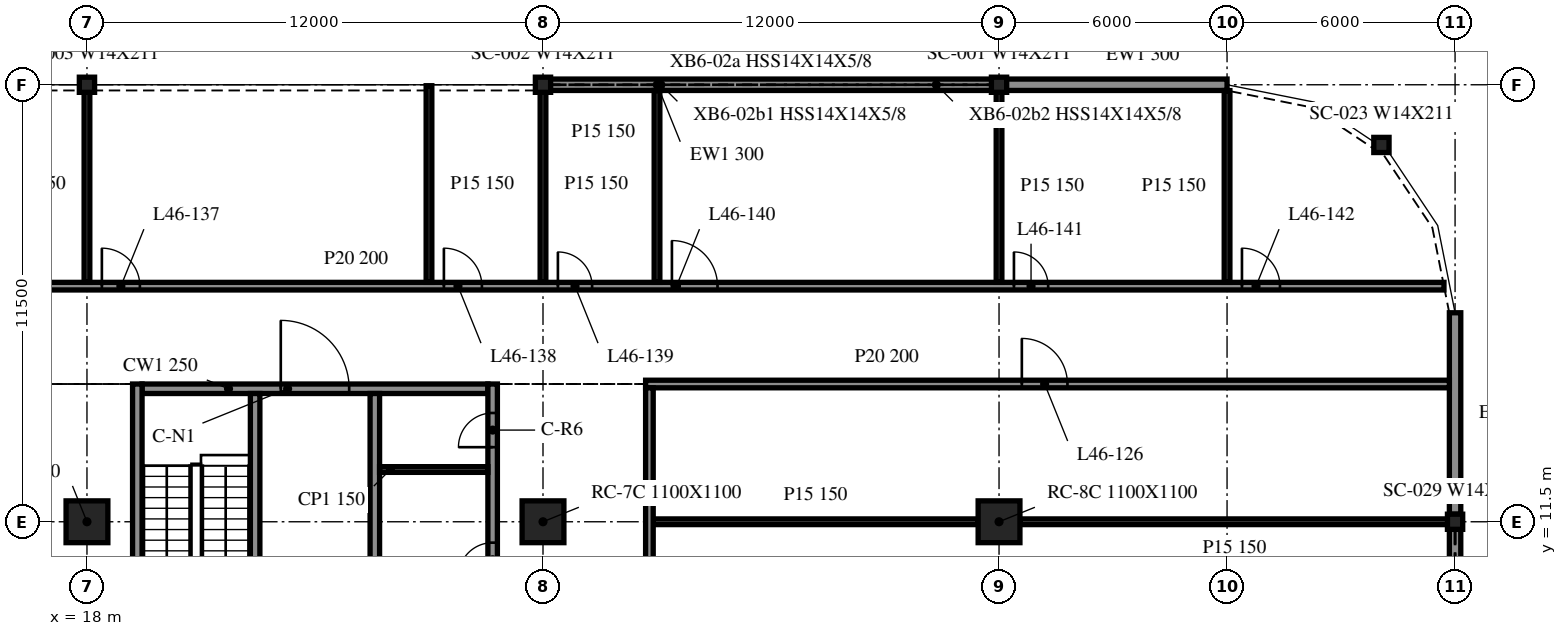
"""IFC4 building model, lengths in metres.
Left out: names, types, materials, properties, quantities, classifications, styles, units other than length and angle.
Written with IfcOpenShell. Run it as: python <this file> out.ifc"""

import sys

from ifc_helpers import new_model, si_unit, direction, frame, frame_2d, origin, origin_2d, place, context, subcontext, project, spatial, rectangle, i_section, extrude, element, fill, save


model = new_model("IFC4")
c1 = context("Model", 3, precision=1e-05, world=origin(), true_north=direction((0.0, 1.0)))
c2 = subcontext(c1, "Body", "Model", "MODEL_VIEW")
j1 = project(units=[si_unit("LENGTHUNIT", "METRE"), si_unit("PLANEANGLEUNIT", "RADIAN")], contexts=[c1])
p1 = place(None, origin())
s1 = spatial("IfcSite", under=j1, at=p1, CompositionType="ELEMENT")
p2 = place(p1, origin())
s2 = spatial("IfcBuilding", under=s1, at=p2, CompositionType="ELEMENT")
p3 = place(p2, frame((0.0, 0.0, 193.9)))
s3 = spatial("IfcBuildingStorey", under=s2, at=p3, CompositionType="ELEMENT", Elevation=193.9)
for number, where, z_axis, x_axis in (
    (1, (18.0, 11.5, -0.34), (0.0, 0.0, 1.0), (1.0, 0.0, 0.0)),
    (2, (30.0, 11.5, -0.34), (0.0, 0.0, 1.0), (1.0, 0.0, 0.0)),
    (3, (42.0, 11.5, -0.34), (0.0, 0.0, 1.0), (1.0, 0.0, 0.0)),
):
    element("IfcColumn", number, at=place(p3, frame(where, z_axis=z_axis, x_axis=x_axis)), inside=s3, PredefinedType="COLUMN", context=c2, shape_type="SweptSolid", body=[
        extrude(rectangle(XDim=1.1, YDim=1.1, at=origin_2d()), origin(), (0.0, 0.0, 1.0), 3.8),
    ])
for number, where, z_axis, x_axis in (
    (4, (52.062, 21.416, -0.34), (0.0, 0.0, 1.0), (1.0, 0.0, 0.0)),
    (5, (42.0, 23.0, -0.34), (0.0, 0.0, 1.0), (1.0, 0.0, 0.0)),
    (6, (30.0, 23.0, -0.34), (0.0, 0.0, 1.0), (1.0, 0.0, 0.0)),
    (7, (18.0, 23.0, -0.34), (0.0, 0.0, 1.0), (1.0, 0.0, 0.0)),
    (8, (54.0, 11.5, -0.34), (0.0, 0.0, 1.0), (1.0, 0.0, 0.0)),
):
    element("IfcColumn", number, at=place(p3, frame(where, z_axis=z_axis, x_axis=x_axis)), inside=s3, PredefinedType="COLUMN", context=c2, shape_type="SweptSolid", body=[
        extrude(i_section(OverallWidth=0.401, OverallDepth=0.399, WebThickness=0.025, FlangeThickness=0.04, at=origin_2d()), origin(), (0.0, 0.0, 1.0), 3.8),
    ])
p4 = place(p3, frame((48.0, 23.0, 0.0), z_axis=(0.0, 0.0, 1.0), x_axis=(-1.0, 0.0, 0.0)))
e9 = element("IfcWall", 9, at=p4, inside=s3, PredefinedType="NOTDEFINED", context=c2, shape_type="SweptSolid", body=[
    extrude(rectangle(XDim=5.988, YDim=0.3, at=frame_2d((2.994, 0.0))), origin(), (0.0, 0.0, 1.0), 2.782),
])
p5 = place(p3, frame((41.988, 23.0, 0.0), z_axis=(0.0, 0.0, 1.0), x_axis=(-1.0, 0.0, 0.0)))
e10 = element("IfcWall", 10, at=p5, inside=s3, PredefinedType="NOTDEFINED", context=c2, shape_type="SweptSolid", body=[
    extrude(rectangle(XDim=11.975, YDim=0.3, at=frame_2d((5.988, 0.0))), origin(), (0.0, 0.0, 1.0), 2.782),
])
p6 = place(p3, frame((54.0, 0.2, 0.0), z_axis=(0.0, 0.0, 1.0), x_axis=(0.0, 1.0, 0.0)))
e11 = element("IfcWall", 11, at=p6, inside=s3, PredefinedType="NOTDEFINED", context=c2, shape_type="SweptSolid", body=[
    extrude(rectangle(XDim=11.1, YDim=0.3, at=frame_2d((5.55, 0.0))), origin(), (0.0, 0.0, 1.0), 2.782),
])
p7 = place(p3, frame((54.0, 11.7, 0.0), z_axis=(0.0, 0.0, 1.0), x_axis=(0.0, 1.0, 0.0)))
e12 = element("IfcWall", 12, at=p7, inside=s3, PredefinedType="NOTDEFINED", context=c2, shape_type="SweptSolid", body=[
    extrude(rectangle(XDim=5.3, YDim=0.3, at=frame_2d((2.65, 0.0))), origin(), (0.0, 0.0, 1.0), 2.782),
])
p8 = place(p3, frame((19.325, 15.125, 0.0), z_axis=(0.0, 0.0, 1.0), x_axis=(0.0, -1.0, 0.0)))
e13 = element("IfcWall", 13, at=p8, inside=s3, PredefinedType="SOLIDWALL", context=c2, shape_type="SweptSolid", body=[
    extrude(rectangle(XDim=24.25, YDim=0.25, at=frame_2d((12.125, 0.0))), origin(), (0.0, 0.0, 1.0), 3.46),
])
p9 = place(p3, frame((28.675, -9.125, 0.0), z_axis=(0.0, 0.0, 1.0), x_axis=(0.0, 1.0, 0.0)))
e14 = element("IfcWall", 14, at=p9, inside=s3, PredefinedType="SOLIDWALL", context=c2, shape_type="SweptSolid", body=[
    extrude(rectangle(XDim=24.25, YDim=0.25, at=frame_2d((12.125, 0.0))), origin(), (0.0, 0.0, 1.0), 3.46),
])
p10 = place(p9, frame((14.425, 0.0, 0.0)))
e15 = element("IfcOpeningElement", 15, at=p10, cuts=e14, PredefinedType="OPENING", context=c2, shape_type="SweptSolid", body=[
    extrude(rectangle(XDim=0.9, YDim=2.1, at=frame_2d((0.45, 1.05))), frame((0.0, 0.135, 0.0), z_axis=(0.0, -1.0, 0.0), x_axis=(1.0, 0.0, 0.0)), (0.0, 0.0, 1.0), 0.27),
])
p11 = place(p9, frame((19.175, 0.0, 0.0)))
e16 = element("IfcOpeningElement", 16, at=p11, cuts=e14, PredefinedType="OPENING", context=c2, shape_type="SweptSolid", body=[
    extrude(rectangle(XDim=0.9, YDim=2.1, at=frame_2d((0.45, 1.05))), frame((0.0, 0.135, 0.0), z_axis=(0.0, -1.0, 0.0), x_axis=(1.0, 0.0, 0.0)), (0.0, 0.0, 1.0), 0.27),
])
p12 = place(p9, frame((22.587, 0.0, 0.0)))
e17 = element("IfcOpeningElement", 17, at=p12, cuts=e14, PredefinedType="OPENING", context=c2, shape_type="SweptSolid", body=[
    extrude(rectangle(XDim=0.9, YDim=2.1, at=frame_2d((0.45, 1.05))), frame((0.0, 0.135, 0.0), z_axis=(0.0, -1.0, 0.0), x_axis=(1.0, 0.0, 0.0)), (0.0, 0.0, 1.0), 0.27),
])
p13 = place(p3, frame((19.45, 15.0, 0.0), z_axis=(0.0, 0.0, 1.0), x_axis=(1.0, 0.0, 0.0)))
e18 = element("IfcWall", 18, at=p13, inside=s3, PredefinedType="SOLIDWALL", context=c2, shape_type="SweptSolid", body=[
    extrude(rectangle(XDim=9.1, YDim=0.25, at=frame_2d((4.55, 0.0))), origin(), (0.0, 0.0, 1.0), 3.46),
])
p14 = place(p13, frame((3.65, 0.0, 0.0)))
e19 = element("IfcOpeningElement", 19, at=p14, cuts=e18, PredefinedType="OPENING", context=c2, shape_type="SweptSolid", body=[
    extrude(rectangle(XDim=1.8, YDim=2.1, at=frame_2d((0.9, 1.05))), frame((0.0, 0.135, 0.0), z_axis=(0.0, -1.0, 0.0), x_axis=(1.0, 0.0, 0.0)), (0.0, 0.0, 1.0), 0.27),
])
p15 = place(p3, frame((22.425, 14.875, 0.0), z_axis=(0.0, 0.0, 1.0), x_axis=(0.0, -1.0, 0.0)))
e20 = element("IfcWall", 20, at=p15, inside=s3, PredefinedType="SOLIDWALL", context=c2, shape_type="SweptSolid", body=[
    extrude(rectangle(XDim=6.25, YDim=0.25, at=frame_2d((3.125, 0.0))), origin(), (0.0, 0.0, 1.0), 3.46),
])
p16 = place(p15, frame((4.85, 0.0, 0.0)))
e21 = element("IfcOpeningElement", 21, at=p16, cuts=e20, PredefinedType="OPENING", context=c2, shape_type="SweptSolid", body=[
    extrude(rectangle(XDim=1.0, YDim=2.1, at=frame_2d((0.5, 1.05))), frame((0.0, 0.135, 0.0), z_axis=(0.0, -1.0, 0.0), x_axis=(1.0, 0.0, 0.0)), (0.0, 0.0, 1.0), 0.27),
])
p17 = place(p3, frame((25.575, 14.875, 0.0), z_axis=(0.0, 0.0, 1.0), x_axis=(0.0, -1.0, 0.0)))
e22 = element("IfcWall", 22, at=p17, inside=s3, PredefinedType="SOLIDWALL", context=c2, shape_type="SweptSolid", body=[
    extrude(rectangle(XDim=17.5, YDim=0.25, at=frame_2d((8.75, 0.0))), origin(), (0.0, 0.0, 1.0), 3.46),
])
p18 = place(p17, frame((15.45, 0.0, 0.0)))
e23 = element("IfcOpeningElement", 23, at=p18, cuts=e22, PredefinedType="OPENING", context=c2, shape_type="SweptSolid", body=[
    extrude(rectangle(XDim=1.1, YDim=2.1, at=frame_2d((0.55, 1.05))), frame((0.0, 0.135, 0.0), z_axis=(0.0, -1.0, 0.0), x_axis=(1.0, 0.0, 0.0)), (0.0, 0.0, 1.0), 0.27),
])
p19 = place(p17, frame((12.8, 0.0, 0.0)))
e24 = element("IfcOpeningElement", 24, at=p19, cuts=e22, PredefinedType="OPENING", context=c2, shape_type="SweptSolid", body=[
    extrude(rectangle(XDim=0.9, YDim=2.1, at=frame_2d((0.45, 1.05))), frame((0.0, 0.135, 0.0), z_axis=(0.0, -1.0, 0.0), x_axis=(1.0, 0.0, 0.0)), (0.0, 0.0, 1.0), 0.27),
])
p20 = place(p3, frame((25.7, 12.875, 0.0), z_axis=(0.0, 0.0, 1.0), x_axis=(1.0, 0.0, 0.0)))
e25 = element("IfcWall", 25, at=p20, inside=s3, PredefinedType="PARTITIONING", context=c2, shape_type="SweptSolid", body=[
    extrude(rectangle(XDim=2.85, YDim=0.15, at=frame_2d((1.425, 0.0))), origin(), (0.0, 0.0, 1.0), 3.46),
])
p21 = place(p3, frame((32.9, 11.5, 0.0), z_axis=(0.0, 0.0, 1.0), x_axis=(1.0, 0.0, 0.0)))
e26 = element("IfcWall", 26, at=p21, inside=s3, PredefinedType="PARTITIONING", context=c2, shape_type="SweptSolid", body=[
    extrude(rectangle(XDim=8.55, YDim=0.15, at=frame_2d((4.275, 0.0))), origin(), (0.0, 0.0, 1.0), 3.46),
])
p22 = place(p3, frame((42.55, 11.5, 0.0), z_axis=(0.0, 0.0, 1.0), x_axis=(1.0, 0.0, 0.0)))
e27 = element("IfcWall", 27, at=p22, inside=s3, PredefinedType="PARTITIONING", context=c2, shape_type="SweptSolid", body=[
    extrude(rectangle(XDim=11.3, YDim=0.15, at=frame_2d((5.65, 0.0))), origin(), (0.0, 0.0, 1.0), 3.46),
])
p23 = place(p3, frame((32.7, 15.125, 0.0), z_axis=(0.0, 0.0, 1.0), x_axis=(1.0, 0.0, 0.0)))
e28 = element("IfcWall", 28, at=p23, inside=s3, PredefinedType="PARTITIONING", context=c2, shape_type="SweptSolid", body=[
    extrude(rectangle(XDim=21.15, YDim=0.2, at=frame_2d((10.575, 0.0))), origin(), (0.0, 0.0, 1.0), 3.46),
])
p24 = place(p23, frame((9.9, 0.0, 0.0)))
e29 = element("IfcOpeningElement", 29, at=p24, cuts=e28, PredefinedType="OPENING", context=c2, shape_type="SweptSolid", body=[
    extrude(rectangle(XDim=1.2, YDim=2.1, at=frame_2d((0.6, 1.05))), frame((0.0, 0.11, 0.0), z_axis=(0.0, -1.0, 0.0), x_axis=(1.0, 0.0, 0.0)), (0.0, 0.0, 1.0), 0.22),
])
p25 = place(p3, frame((-41.708, 17.7, 0.0), z_axis=(0.0, 0.0, 1.0), x_axis=(1.0, 0.0, 0.0)))
e30 = element("IfcWall", 30, at=p25, inside=s3, PredefinedType="PARTITIONING", context=c2, shape_type="SweptSolid", body=[
    extrude(rectangle(XDim=95.416, YDim=0.2, at=frame_2d((47.708, 0.0))), origin(), (0.0, 0.0, 1.0), 3.46),
])
p26 = place(p25, frame((7.5, 0.0, 0.0)))
e31 = element("IfcOpeningElement", 31, at=p26, cuts=e30, PredefinedType="OPENING", context=c2, shape_type="SweptSolid", body=[
    extrude(rectangle(XDim=1.0, YDim=2.1, at=frame_2d((0.5, 1.05))), frame((0.0, 0.11, 0.0), z_axis=(0.0, -1.0, 0.0), x_axis=(1.0, 0.0, 0.0)), (0.0, 0.0, 1.0), 0.22),
])
p27 = place(p25, frame((10.5, 0.0, 0.0)))
e32 = element("IfcOpeningElement", 32, at=p27, cuts=e30, PredefinedType="OPENING", context=c2, shape_type="SweptSolid", body=[
    extrude(rectangle(XDim=1.0, YDim=2.1, at=frame_2d((0.5, 1.05))), frame((0.0, 0.11, 0.0), z_axis=(0.0, -1.0, 0.0), x_axis=(1.0, 0.0, 0.0)), (0.0, 0.0, 1.0), 0.22),
])
p28 = place(p25, frame((13.5, 0.0, 0.0)))
e33 = element("IfcOpeningElement", 33, at=p28, cuts=e30, PredefinedType="OPENING", context=c2, shape_type="SweptSolid", body=[
    extrude(rectangle(XDim=0.9, YDim=2.1, at=frame_2d((0.45, 1.05))), frame((0.0, 0.11, 0.0), z_axis=(0.0, -1.0, 0.0), x_axis=(1.0, 0.0, 0.0)), (0.0, 0.0, 1.0), 0.22),
])
p29 = place(p25, frame((22.3, 0.0, 0.0)))
e34 = element("IfcOpeningElement", 34, at=p29, cuts=e30, PredefinedType="OPENING", context=c2, shape_type="SweptSolid", body=[
    extrude(rectangle(XDim=1.2, YDim=2.1, at=frame_2d((0.6, 1.05))), frame((0.0, 0.11, 0.0), z_axis=(0.0, -1.0, 0.0), x_axis=(1.0, 0.0, 0.0)), (0.0, 0.0, 1.0), 0.22),
])
p30 = place(p25, frame((28.5, 0.0, 0.0)))
e35 = element("IfcOpeningElement", 35, at=p30, cuts=e30, PredefinedType="OPENING", context=c2, shape_type="SweptSolid", body=[
    extrude(rectangle(XDim=0.9, YDim=2.1, at=frame_2d((0.45, 1.05))), frame((0.0, 0.11, 0.0), z_axis=(0.0, -1.0, 0.0), x_axis=(1.0, 0.0, 0.0)), (0.0, 0.0, 1.0), 0.22),
])
p31 = place(p25, frame((37.5, 0.0, 0.0)))
e36 = element("IfcOpeningElement", 36, at=p31, cuts=e30, PredefinedType="OPENING", context=c2, shape_type="SweptSolid", body=[
    extrude(rectangle(XDim=1.0, YDim=2.1, at=frame_2d((0.5, 1.05))), frame((0.0, 0.11, 0.0), z_axis=(0.0, -1.0, 0.0), x_axis=(1.0, 0.0, 0.0)), (0.0, 0.0, 1.0), 0.22),
])
p32 = place(p25, frame((40.5, 0.0, 0.0)))
e37 = element("IfcOpeningElement", 37, at=p32, cuts=e30, PredefinedType="OPENING", context=c2, shape_type="SweptSolid", body=[
    extrude(rectangle(XDim=1.0, YDim=2.1, at=frame_2d((0.5, 1.05))), frame((0.0, 0.11, 0.0), z_axis=(0.0, -1.0, 0.0), x_axis=(1.0, 0.0, 0.0)), (0.0, 0.0, 1.0), 0.22),
])
p33 = place(p25, frame((43.5, 0.0, 0.0)))
e38 = element("IfcOpeningElement", 38, at=p33, cuts=e30, PredefinedType="OPENING", context=c2, shape_type="SweptSolid", body=[
    extrude(rectangle(XDim=0.9, YDim=2.1, at=frame_2d((0.45, 1.05))), frame((0.0, 0.11, 0.0), z_axis=(0.0, -1.0, 0.0), x_axis=(1.0, 0.0, 0.0)), (0.0, 0.0, 1.0), 0.22),
])
p34 = place(p25, frame((47.1, 0.0, 0.0)))
e39 = element("IfcOpeningElement", 39, at=p34, cuts=e30, PredefinedType="OPENING", context=c2, shape_type="SweptSolid", body=[
    extrude(rectangle(XDim=1.2, YDim=2.1, at=frame_2d((0.6, 1.05))), frame((0.0, 0.11, 0.0), z_axis=(0.0, -1.0, 0.0), x_axis=(1.0, 0.0, 0.0)), (0.0, 0.0, 1.0), 0.22),
])
p35 = place(p25, frame((54.1, 0.0, 0.0)))
e40 = element("IfcOpeningElement", 40, at=p35, cuts=e30, PredefinedType="OPENING", context=c2, shape_type="SweptSolid", body=[
    extrude(rectangle(XDim=0.9, YDim=2.1, at=frame_2d((0.45, 1.05))), frame((0.0, 0.11, 0.0), z_axis=(0.0, -1.0, 0.0), x_axis=(1.0, 0.0, 0.0)), (0.0, 0.0, 1.0), 0.22),
])
p36 = place(p25, frame((60.1, 0.0, 0.0)))
e41 = element("IfcOpeningElement", 41, at=p36, cuts=e30, PredefinedType="OPENING", context=c2, shape_type="SweptSolid", body=[
    extrude(rectangle(XDim=1.0, YDim=2.1, at=frame_2d((0.5, 1.05))), frame((0.0, 0.11, 0.0), z_axis=(0.0, -1.0, 0.0), x_axis=(1.0, 0.0, 0.0)), (0.0, 0.0, 1.0), 0.22),
])
p37 = place(p25, frame((69.1, 0.0, 0.0)))
e42 = element("IfcOpeningElement", 42, at=p37, cuts=e30, PredefinedType="OPENING", context=c2, shape_type="SweptSolid", body=[
    extrude(rectangle(XDim=1.0, YDim=2.1, at=frame_2d((0.5, 1.05))), frame((0.0, 0.11, 0.0), z_axis=(0.0, -1.0, 0.0), x_axis=(1.0, 0.0, 0.0)), (0.0, 0.0, 1.0), 0.22),
])
p38 = place(p25, frame((72.1, 0.0, 0.0)))
e43 = element("IfcOpeningElement", 43, at=p38, cuts=e30, PredefinedType="OPENING", context=c2, shape_type="SweptSolid", body=[
    extrude(rectangle(XDim=0.9, YDim=2.1, at=frame_2d((0.45, 1.05))), frame((0.0, 0.11, 0.0), z_axis=(0.0, -1.0, 0.0), x_axis=(1.0, 0.0, 0.0)), (0.0, 0.0, 1.0), 0.22),
])
p39 = place(p25, frame((75.1, 0.0, 0.0)))
e44 = element("IfcOpeningElement", 44, at=p39, cuts=e30, PredefinedType="OPENING", context=c2, shape_type="SweptSolid", body=[
    extrude(rectangle(XDim=1.2, YDim=2.1, at=frame_2d((0.6, 1.05))), frame((0.0, 0.11, 0.0), z_axis=(0.0, -1.0, 0.0), x_axis=(1.0, 0.0, 0.0)), (0.0, 0.0, 1.0), 0.22),
])
p40 = place(p25, frame((84.1, 0.0, 0.0)))
e45 = element("IfcOpeningElement", 45, at=p40, cuts=e30, PredefinedType="OPENING", context=c2, shape_type="SweptSolid", body=[
    extrude(rectangle(XDim=0.9, YDim=2.1, at=frame_2d((0.45, 1.05))), frame((0.0, 0.11, 0.0), z_axis=(0.0, -1.0, 0.0), x_axis=(1.0, 0.0, 0.0)), (0.0, 0.0, 1.0), 0.22),
])
p41 = place(p25, frame((90.1, 0.0, 0.0)))
e46 = element("IfcOpeningElement", 46, at=p41, cuts=e30, PredefinedType="OPENING", context=c2, shape_type="SweptSolid", body=[
    extrude(rectangle(XDim=1.0, YDim=2.1, at=frame_2d((0.5, 1.05))), frame((0.0, 0.11, 0.0), z_axis=(0.0, -1.0, 0.0), x_axis=(1.0, 0.0, 0.0)), (0.0, 0.0, 1.0), 0.22),
])
for number, where, z_axis, x_axis in (
    (47, (18.0, 17.8, 0.0), (0.0, 0.0, 1.0), (0.0, 1.0, 0.0)),
    (48, (27.0, 17.8, 0.0), (0.0, 0.0, 1.0), (0.0, 1.0, 0.0)),
    (49, (30.0, 17.8, 0.0), (0.0, 0.0, 1.0), (0.0, 1.0, 0.0)),
):
    element("IfcWall", number, at=place(p3, frame(where, z_axis=z_axis, x_axis=x_axis)), inside=s3, PredefinedType="PARTITIONING", context=c2, shape_type="SweptSolid", body=[
        extrude(rectangle(XDim=5.175, YDim=0.15, at=frame_2d((2.587, 0.0))), origin(), (0.0, 0.0, 1.0), 3.46),
    ])
p42 = place(p3, frame((32.8, -9.025, 0.0), z_axis=(0.0, 0.0, 1.0), x_axis=(0.0, 1.0, 0.0)))
e50 = element("IfcWall", 50, at=p42, inside=s3, PredefinedType="PARTITIONING", context=c2, shape_type="SweptSolid", body=[
    extrude(rectangle(XDim=24.05, YDim=0.2, at=frame_2d((12.025, 0.0))), origin(), (0.0, 0.0, 1.0), 3.46),
])
for number, where, z_axis, x_axis in (
    (51, (33.0, 17.8, 0.0), (0.0, 0.0, 1.0), (0.0, 1.0, 0.0)),
    (52, (42.0, 17.8, 0.0), (0.0, 0.0, 1.0), (0.0, 1.0, 0.0)),
):
    element("IfcWall", number, at=place(p3, frame(where, z_axis=z_axis, x_axis=x_axis)), inside=s3, PredefinedType="PARTITIONING", context=c2, shape_type="SweptSolid", body=[
        extrude(rectangle(XDim=5.05, YDim=0.15, at=frame_2d((2.525, 0.0))), origin(), (0.0, 0.0, 1.0), 3.46),
    ])
p43 = place(p3, frame((48.0, 17.8, 0.0), z_axis=(0.0, 0.0, 1.0), x_axis=(0.0, 1.0, 0.0)))
e53 = element("IfcWall", 53, at=p43, inside=s3, PredefinedType="PARTITIONING", context=c2, shape_type="SweptSolid", body=[
    extrude(rectangle(XDim=5.047, YDim=0.15, at=frame_2d((2.523, 0.0))), origin(), (0.0, 0.0, 1.0), 3.46),
])
p44 = place(p14, origin())
e54 = element("IfcDoor", 54, at=p44, inside=s3, OperationType="DOUBLE_DOOR_SINGLE_SWING", PredefinedType="DOOR", context=c2, shape_type="SweptSolid", body=[
    extrude(rectangle(XDim=1.8, YDim=2.1, at=frame_2d((0.9, 1.05))), frame((0.0, 0.025, 0.0), z_axis=(0.0, -1.0, 0.0), x_axis=(1.0, 0.0, 0.0)), (0.0, 0.0, 1.0), 0.05),
])
fill(e19, e54)
p45 = place(p11, origin())
e55 = element("IfcDoor", 55, at=p45, inside=s3, OperationType="SINGLE_SWING_LEFT", PredefinedType="DOOR", context=c2, shape_type="SweptSolid", body=[
    extrude(rectangle(XDim=0.9, YDim=2.1, at=frame_2d((0.45, 1.05))), frame((0.0, 0.025, 0.0), z_axis=(0.0, -1.0, 0.0), x_axis=(1.0, 0.0, 0.0)), (0.0, 0.0, 1.0), 0.05),
])
fill(e16, e55)
p46 = place(p12, origin())
e56 = element("IfcDoor", 56, at=p46, inside=s3, OperationType="SINGLE_SWING_RIGHT", PredefinedType="DOOR", context=c2, shape_type="SweptSolid", body=[
    extrude(rectangle(XDim=0.9, YDim=2.1, at=frame_2d((0.45, 1.05))), frame((0.0, 0.025, 0.0), z_axis=(0.0, -1.0, 0.0), x_axis=(1.0, 0.0, 0.0)), (0.0, 0.0, 1.0), 0.05),
])
fill(e17, e56)
p47 = place(p24, origin())
e57 = element("IfcDoor", 57, at=p47, inside=s3, OperationType="SINGLE_SWING_RIGHT", PredefinedType="DOOR", context=c2, shape_type="SweptSolid", body=[
    extrude(rectangle(XDim=1.2, YDim=2.1, at=frame_2d((0.6, 1.05))), frame((0.0, 0.025, 0.0), z_axis=(0.0, -1.0, 0.0), x_axis=(1.0, 0.0, 0.0)), (0.0, 0.0, 1.0), 0.05),
])
fill(e29, e57)
p48 = place(p36, origin())
e58 = element("IfcDoor", 58, at=p48, inside=s3, OperationType="SINGLE_SWING_RIGHT", PredefinedType="DOOR", context=c2, shape_type="SweptSolid", body=[
    extrude(rectangle(XDim=1.0, YDim=2.1, at=frame_2d((0.5, 1.05))), frame((0.0, 0.025, 0.0), z_axis=(0.0, -1.0, 0.0), x_axis=(1.0, 0.0, 0.0)), (0.0, 0.0, 1.0), 0.05),
])
fill(e41, e58)
p49 = place(p37, origin())
e59 = element("IfcDoor", 59, at=p49, inside=s3, OperationType="SINGLE_SWING_RIGHT", PredefinedType="DOOR", context=c2, shape_type="SweptSolid", body=[
    extrude(rectangle(XDim=1.0, YDim=2.1, at=frame_2d((0.5, 1.05))), frame((0.0, 0.025, 0.0), z_axis=(0.0, -1.0, 0.0), x_axis=(1.0, 0.0, 0.0)), (0.0, 0.0, 1.0), 0.05),
])
fill(e42, e59)
p50 = place(p38, origin())
e60 = element("IfcDoor", 60, at=p50, inside=s3, OperationType="SINGLE_SWING_RIGHT", PredefinedType="DOOR", context=c2, shape_type="SweptSolid", body=[
    extrude(rectangle(XDim=0.9, YDim=2.1, at=frame_2d((0.45, 1.05))), frame((0.0, 0.025, 0.0), z_axis=(0.0, -1.0, 0.0), x_axis=(1.0, 0.0, 0.0)), (0.0, 0.0, 1.0), 0.05),
])
fill(e43, e60)
p51 = place(p39, origin())
e61 = element("IfcDoor", 61, at=p51, inside=s3, OperationType="SINGLE_SWING_RIGHT", PredefinedType="DOOR", context=c2, shape_type="SweptSolid", body=[
    extrude(rectangle(XDim=1.2, YDim=2.1, at=frame_2d((0.6, 1.05))), frame((0.0, 0.025, 0.0), z_axis=(0.0, -1.0, 0.0), x_axis=(1.0, 0.0, 0.0)), (0.0, 0.0, 1.0), 0.05),
])
fill(e44, e61)
p52 = place(p40, origin())
e62 = element("IfcDoor", 62, at=p52, inside=s3, OperationType="SINGLE_SWING_RIGHT", PredefinedType="DOOR", context=c2, shape_type="SweptSolid", body=[
    extrude(rectangle(XDim=0.9, YDim=2.1, at=frame_2d((0.45, 1.05))), frame((0.0, 0.025, 0.0), z_axis=(0.0, -1.0, 0.0), x_axis=(1.0, 0.0, 0.0)), (0.0, 0.0, 1.0), 0.05),
])
fill(e45, e62)
p53 = place(p41, origin())
e63 = element("IfcDoor", 63, at=p53, inside=s3, OperationType="SINGLE_SWING_RIGHT", PredefinedType="DOOR", context=c2, shape_type="SweptSolid", body=[
    extrude(rectangle(XDim=1.0, YDim=2.1, at=frame_2d((0.5, 1.05))), frame((0.0, 0.025, 0.0), z_axis=(0.0, -1.0, 0.0), x_axis=(1.0, 0.0, 0.0)), (0.0, 0.0, 1.0), 0.05),
])
fill(e46, e63)
save(model, sys.argv[1])
